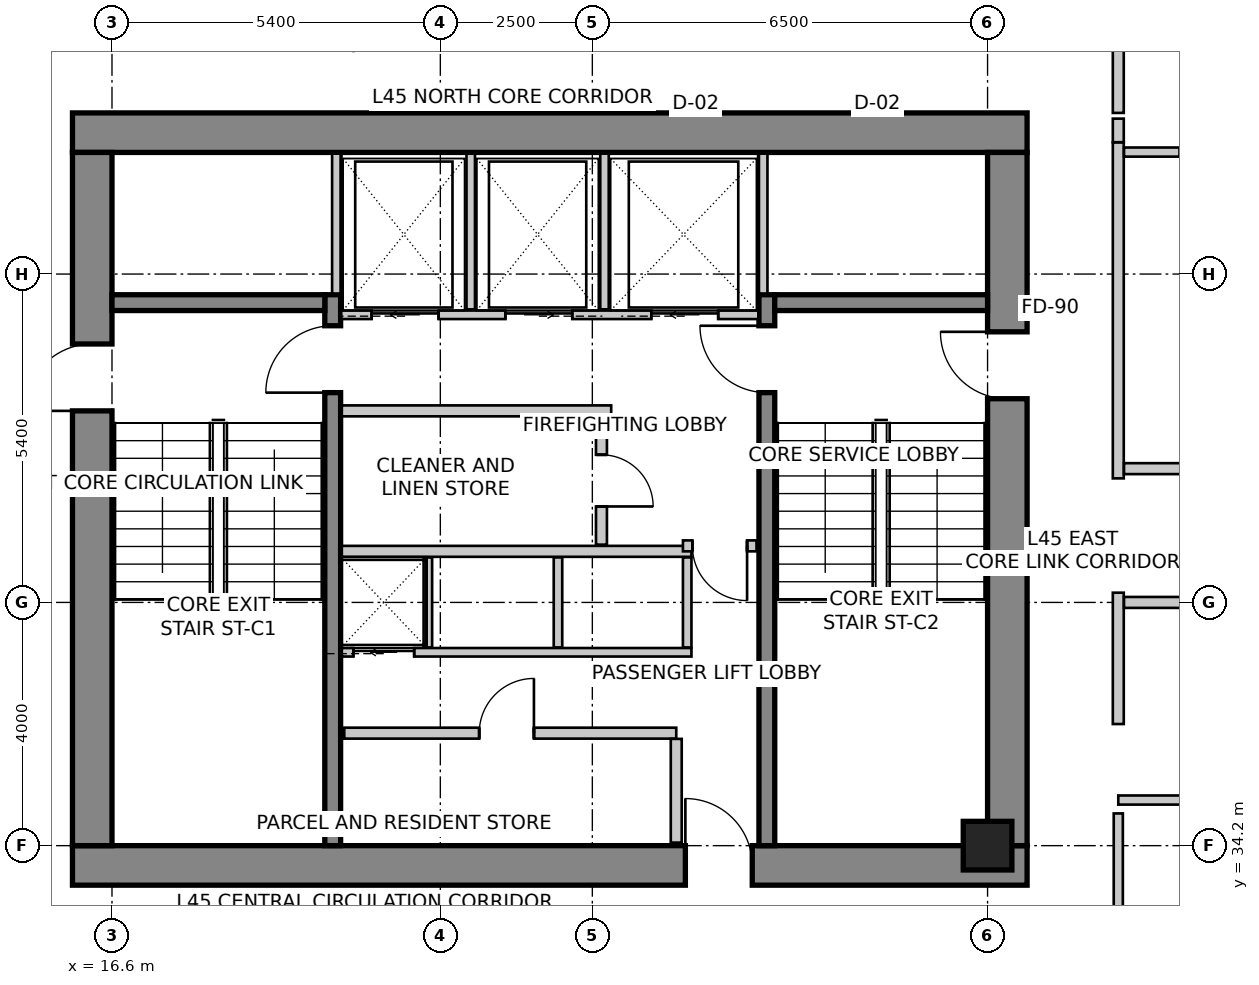
"""IFC4 building model, lengths in metres.
Left out: names, types, materials, properties, quantities, classifications, styles, units other than length and angle.
Written with IfcOpenShell. Run it as: python <this file> out.ifc"""

import sys

from ifc_helpers import new_model, si_unit, direction, frame, frame_2d, origin, origin_2d, place, context, subcontext, project, spatial, rectangle, extrude, source, transform, mapped, element, fill, save


model = new_model("IFC4")
c1 = context("Model", 3, precision=1e-05, world=origin(), true_north=direction((0.0, 1.0)))
c2 = subcontext(c1, "Body", "Model", "MODEL_VIEW")
j1 = project(units=[si_unit("LENGTHUNIT", "METRE"), si_unit("PLANEANGLEUNIT", "RADIAN")], contexts=[c1])
p1 = place(None, origin())
s1 = spatial("IfcSite", under=j1, at=p1, CompositionType="ELEMENT")
p2 = place(p1, origin())
s2 = spatial("IfcBuilding", under=s1, at=p2, CompositionType="ELEMENT")
p3 = place(p2, frame((0.0, 0.0, 183.4)))
s3 = spatial("IfcBuildingStorey", under=s2, at=p3, CompositionType="ELEMENT", Elevation=183.4)
p4 = place(p3, frame((15.95, 45.925, 0.0), z_axis=(0.0, 0.0, 1.0), x_axis=(1.0, 0.0, 0.0)))
e1 = element("IfcWall", 1, at=p4, inside=s3, PredefinedType="SHEAR", context=c2, shape_type="SweptSolid", body=[
    extrude(rectangle(XDim=15.7, YDim=0.65, at=frame_2d((7.85, 0.0))), origin(), (0.0, 0.0, 1.0), 3.5),
])
p5 = place(p3, frame((15.95, 33.875, 0.0), z_axis=(0.0, 0.0, 1.0), x_axis=(1.0, 0.0, 0.0)))
e2 = element("IfcWall", 2, at=p5, inside=s3, PredefinedType="SHEAR", context=c2, shape_type="SweptSolid", body=[
    extrude(rectangle(XDim=15.7, YDim=0.65, at=frame_2d((7.85, 0.0))), origin(), (0.0, 0.0, 1.0), 3.5),
])
m1 = source(origin(), c2, "Body", "SweptSolid", [
    extrude(rectangle(XDim=1.1, YDim=2.15, at=frame_2d((0.55, 1.075))), frame((0.0, 0.335, 0.0), z_axis=(0.0, -1.0, 0.0), x_axis=(1.0, 0.0, 0.0)), (0.0, 0.0, 1.0), 0.67),
])
p6 = place(p5, frame((10.08, 0.0, 0.0)))
e3 = element("IfcOpeningElement", 3, at=p6, cuts=e2, PredefinedType="OPENING", context=c2, shape_type="MappedRepresentation", body=[
    mapped(m1, transform((0.0, 0.0, 0.0), scale=1.0)),
])
p7 = place(p3, frame((16.275, 34.2, 0.0), z_axis=(0.0, 0.0, 1.0), x_axis=(0.0, 1.0, 0.0)))
e4 = element("IfcWall", 4, at=p7, inside=s3, PredefinedType="SHEAR", context=c2, shape_type="SweptSolid", body=[
    extrude(rectangle(XDim=11.4, YDim=0.65, at=frame_2d((5.7, 0.0))), origin(), (0.0, 0.0, 1.0), 3.5),
])
p8 = place(p7, frame((7.15, 0.0, 0.0)))
e5 = element("IfcOpeningElement", 5, at=p8, cuts=e4, PredefinedType="OPENING", context=c2, shape_type="MappedRepresentation", body=[
    mapped(m1, transform((0.0, 0.0, 0.0), scale=1.0)),
])
p9 = place(p3, frame((31.325, 34.2, 0.0), z_axis=(0.0, 0.0, 1.0), x_axis=(0.0, 1.0, 0.0)))
e6 = element("IfcWall", 6, at=p9, inside=s3, PredefinedType="SHEAR", context=c2, shape_type="SweptSolid", body=[
    extrude(rectangle(XDim=11.4, YDim=0.65, at=frame_2d((5.7, 0.0))), origin(), (0.0, 0.0, 1.0), 3.5),
])
p10 = place(p9, frame((7.35, 0.0, 0.0)))
e7 = element("IfcOpeningElement", 7, at=p10, cuts=e6, PredefinedType="OPENING", context=c2, shape_type="MappedRepresentation", body=[
    mapped(m1, transform((0.0, 0.0, 0.0), scale=1.0)),
])
p11 = place(p3, frame((20.23, 34.2, 0.0), z_axis=(0.0, 0.0, 1.0), x_axis=(0.0, 1.0, 0.0)))
e8 = element("IfcWall", 8, at=p11, inside=s3, PredefinedType="SHEAR", context=c2, shape_type="SweptSolid", body=[
    extrude(rectangle(XDim=9.06, YDim=0.26, at=frame_2d((4.53, 0.0))), origin(), (0.0, 0.0, 1.0), 3.5),
])
m2 = source(origin(), c2, "Body", "SweptSolid", [
    extrude(rectangle(XDim=1.1, YDim=2.15, at=frame_2d((0.55, 1.075))), frame((0.0, 0.14, 0.0), z_axis=(0.0, -1.0, 0.0), x_axis=(1.0, 0.0, 0.0)), (0.0, 0.0, 1.0), 0.28),
])
p12 = place(p11, frame((7.45, 0.0, 0.0)))
e9 = element("IfcOpeningElement", 9, at=p12, cuts=e8, PredefinedType="OPENING", context=c2, shape_type="MappedRepresentation", body=[
    mapped(m2, transform((0.0, 0.0, 0.0), scale=1.0)),
])
p13 = place(p3, frame((27.37, 34.2, 0.0), z_axis=(0.0, 0.0, 1.0), x_axis=(0.0, 1.0, 0.0)))
e10 = element("IfcWall", 10, at=p13, inside=s3, PredefinedType="SHEAR", context=c2, shape_type="SweptSolid", body=[
    extrude(rectangle(XDim=9.06, YDim=0.26, at=frame_2d((4.53, 0.0))), origin(), (0.0, 0.0, 1.0), 3.5),
])
p14 = place(p13, frame((7.45, 0.0, 0.0)))
e11 = element("IfcOpeningElement", 11, at=p14, cuts=e10, PredefinedType="OPENING", context=c2, shape_type="MappedRepresentation", body=[
    mapped(m2, transform((0.0, 0.0, 0.0), scale=1.0)),
])
for number, where, z_axis, x_axis in (
    (12, (16.6, 43.13, 0.0), (0.0, 0.0, 1.0), (1.0, 0.0, 0.0)),
    (13, (27.5, 43.13, 0.0), (0.0, 0.0, 1.0), (1.0, 0.0, 0.0)),
):
    element("IfcWall", number, at=place(p3, frame(where, z_axis=z_axis, x_axis=x_axis)), inside=s3, PredefinedType="SHEAR", context=c2, shape_type="SweptSolid", body=[
        extrude(rectangle(XDim=3.5, YDim=0.26, at=frame_2d((1.75, 0.0))), origin(), (0.0, 0.0, 1.0), 3.5),
    ])
m3 = source(origin(), c2, "Body", "SweptSolid", [
    extrude(rectangle(XDim=0.8, YDim=0.8, at=origin_2d()), origin(), (0.0, 0.0, 1.0), 3.5),
])
p15 = place(p3, frame((31.0, 34.2, 0.0), z_axis=(0.0, 0.0, 1.0), x_axis=(1.0, 0.0, 0.0)))
e14 = element("IfcColumn", 14, at=p15, inside=s3, PredefinedType="COLUMN", context=c2, shape_type="MappedRepresentation", body=[
    mapped(m3, transform((0.0, 0.0, 0.0), scale=1.0)),
])
p16 = place(p3, frame((21.875, 52.742, 0.0), z_axis=(0.0, 0.0, 1.0), x_axis=(-0.843666375448, -0.536867811419, 0.0)))
e15 = element("IfcWall", 15, at=p16, inside=s3, PredefinedType="SOLIDWALL", context=c2, shape_type="SweptSolid", body=[
    extrude(rectangle(XDim=10.284, YDim=0.3, at=frame_2d((5.142, 0.0))), origin(), (0.0, 0.0, 1.0), 3.25),
])
m4 = source(origin(), c2, "Body", "SweptSolid", [
    extrude(rectangle(XDim=2.4, YDim=2.2, at=frame_2d((1.2, 1.1))), frame((0.0, 0.16, 0.0), z_axis=(0.0, -1.0, 0.0), x_axis=(1.0, 0.0, 0.0)), (0.0, 0.0, 1.0), 0.32),
])
p17 = place(p16, frame((3.307, 0.0, 0.85)))
e16 = element("IfcOpeningElement", 16, at=p17, cuts=e15, PredefinedType="OPENING", context=c2, shape_type="MappedRepresentation", body=[
    mapped(m4, transform((0.0, 0.0, 0.0), scale=1.0)),
])
p18 = place(p3, frame((20.37, 42.93, 0.0), z_axis=(0.0, 0.0, 1.0), x_axis=(1.0, 0.0, 0.0)))
e17 = element("IfcWall", 17, at=p18, inside=s3, PredefinedType="SOLIDWALL", context=c2, shape_type="SweptSolid", body=[
    extrude(rectangle(XDim=6.86, YDim=0.14, at=frame_2d((3.43, 0.0))), origin(), (0.0, 0.0, 1.0), 3.25),
])
m5 = source(origin(), c2, "Body", "SweptSolid", [
    extrude(rectangle(XDim=1.1, YDim=2.15, at=frame_2d((0.55, 1.075))), frame((0.0, 0.08, 0.0), z_axis=(0.0, -1.0, 0.0), x_axis=(1.0, 0.0, 0.0)), (0.0, 0.0, 1.0), 0.16),
])
p19 = place(p18, frame((0.5, 0.0, 0.0)))
e18 = element("IfcOpeningElement", 18, at=p19, cuts=e17, PredefinedType="OPENING", context=c2, shape_type="MappedRepresentation", body=[
    mapped(m5, transform((0.0, 0.0, 0.0), scale=1.0)),
])
p20 = place(p18, frame((2.7, 0.0, 0.0)))
e19 = element("IfcOpeningElement", 19, at=p20, cuts=e17, PredefinedType="OPENING", context=c2, shape_type="MappedRepresentation", body=[
    mapped(m5, transform((0.0, 0.0, 0.0), scale=1.0)),
])
p21 = place(p18, frame((5.1, 0.0, 0.0)))
e20 = element("IfcOpeningElement", 20, at=p21, cuts=e17, PredefinedType="OPENING", context=c2, shape_type="MappedRepresentation", body=[
    mapped(m5, transform((0.0, 0.0, 0.0), scale=1.0)),
])
for number, where, z_axis, x_axis in (
    (21, (20.29, 43.28, 0.0), (0.0, 0.0, 1.0), (0.0, 1.0, 0.0)),
    (22, (27.31, 43.28, 0.0), (0.0, 0.0, 1.0), (0.0, 1.0, 0.0)),
):
    element("IfcWall", number, at=place(p3, frame(where, z_axis=z_axis, x_axis=x_axis)), inside=s3, PredefinedType="SOLIDWALL", context=c2, shape_type="SweptSolid", body=[
        extrude(rectangle(XDim=2.3, YDim=0.14, at=frame_2d((1.15, 0.0))), origin(), (0.0, 0.0, 1.0), 3.25),
    ])
for number, where, z_axis, x_axis in (
    (23, (22.5, 43.02, 0.0), (0.0, 0.0, 1.0), (0.0, 1.0, 0.0)),
    (24, (24.7, 43.02, 0.0), (0.0, 0.0, 1.0), (0.0, 1.0, 0.0)),
):
    element("IfcWall", number, at=place(p3, frame(where, z_axis=z_axis, x_axis=x_axis)), inside=s3, PredefinedType="SOLIDWALL", context=c2, shape_type="SweptSolid", body=[
        extrude(rectangle(XDim=2.56, YDim=0.14, at=frame_2d((1.28, 0.0))), origin(), (0.0, 0.0, 1.0), 3.25),
    ])
p22 = place(p3, frame((20.38, 37.38, 0.0), z_axis=(0.0, 0.0, 1.0), x_axis=(1.0, 0.0, 0.0)))
e25 = element("IfcWall", 25, at=p22, inside=s3, PredefinedType="SOLIDWALL", context=c2, shape_type="SweptSolid", body=[
    extrude(rectangle(XDim=5.75, YDim=0.14, at=frame_2d((2.875, 0.0))), origin(), (0.0, 0.0, 1.0), 3.25),
])
m6 = source(origin(), c2, "Body", "SweptSolid", [
    extrude(rectangle(XDim=1.0, YDim=2.15, at=frame_2d((0.5, 1.075))), frame((0.0, 0.08, 0.0), z_axis=(0.0, -1.0, 0.0), x_axis=(1.0, 0.0, 0.0)), (0.0, 0.0, 1.0), 0.16),
])
p23 = place(p22, frame((0.19, 0.0, 0.0)))
e26 = element("IfcOpeningElement", 26, at=p23, cuts=e25, PredefinedType="OPENING", context=c2, shape_type="MappedRepresentation", body=[
    mapped(m6, transform((0.0, 0.0, 0.0), scale=1.0)),
])
p24 = place(p3, frame((20.38, 39.04, 0.0), z_axis=(0.0, 0.0, 1.0), x_axis=(1.0, 0.0, 0.0)))
e27 = element("IfcWall", 27, at=p24, inside=s3, PredefinedType="SOLIDWALL", context=c2, shape_type="SweptSolid", body=[
    extrude(rectangle(XDim=5.75, YDim=0.18, at=frame_2d((2.875, 0.0))), origin(), (0.0, 0.0, 1.0), 3.25),
])
for number, where, z_axis, x_axis in (
    (28, (26.06, 37.46, 0.0), (0.0, 0.0, 1.0), (0.0, 1.0, 0.0)),
    (29, (21.795, 37.46, 0.0), (0.0, 0.0, 1.0), (0.0, 1.0, 0.0)),
    (30, (23.935, 37.46, 0.0), (0.0, 0.0, 1.0), (0.0, 1.0, 0.0)),
):
    element("IfcWall", number, at=place(p3, frame(where, z_axis=z_axis, x_axis=x_axis)), inside=s3, PredefinedType="SOLIDWALL", context=c2, shape_type="SweptSolid", body=[
        extrude(rectangle(XDim=1.48, YDim=0.14, at=frame_2d((0.74, 0.0))), origin(), (0.0, 0.0, 1.0), 3.25),
    ])
p25 = place(p3, frame((24.81, 41.35, 0.0), z_axis=(0.0, 0.0, 1.0), x_axis=(-1.0, 0.0, 0.0)))
e31 = element("IfcWall", 31, at=p25, inside=s3, PredefinedType="PARTITIONING", context=c2, shape_type="SweptSolid", body=[
    extrude(rectangle(XDim=4.43, YDim=0.18, at=frame_2d((2.215, 0.0))), origin(), (0.0, 0.0, 1.0), 3.25),
])
p26 = place(p3, frame((24.65, 41.256, 0.0), z_axis=(0.0, 0.0, 1.0), x_axis=(0.0, -1.0, 0.0)))
e32 = element("IfcWall", 32, at=p26, inside=s3, PredefinedType="PARTITIONING", context=c2, shape_type="SweptSolid", body=[
    extrude(rectangle(XDim=2.106, YDim=0.18, at=frame_2d((1.053, 0.0))), origin(), (0.0, 0.0, 1.0), 3.25),
])
m7 = source(origin(), c2, "Body", "SweptSolid", [
    extrude(rectangle(XDim=0.85, YDim=2.15, at=frame_2d((0.425, 1.075))), frame((0.0, 0.1, 0.0), z_axis=(0.0, -1.0, 0.0), x_axis=(1.0, 0.0, 0.0)), (0.0, 0.0, 1.0), 0.2),
])
p27 = place(p26, frame((0.628, 0.0, 0.0)))
e33 = element("IfcOpeningElement", 33, at=p27, cuts=e32, PredefinedType="OPENING", context=c2, shape_type="MappedRepresentation", body=[
    mapped(m7, transform((0.0, 0.0, 0.0), scale=1.0)),
])
p28 = place(p3, frame((27.2, 39.13, 0.0), z_axis=(0.0, 0.0, 1.0), x_axis=(-1.0, 0.0, 0.0)))
e34 = element("IfcWall", 34, at=p28, inside=s3, PredefinedType="PARTITIONING", context=c2, shape_type="SweptSolid", body=[
    extrude(rectangle(XDim=1.21, YDim=0.18, at=frame_2d((0.605, 0.0))), origin(), (0.0, 0.0, 1.0), 3.25),
])
m8 = source(origin(), c2, "Body", "SweptSolid", [
    extrude(rectangle(XDim=0.9, YDim=2.15, at=frame_2d((0.45, 1.075))), frame((0.0, 0.1, 0.0), z_axis=(0.0, -1.0, 0.0), x_axis=(1.0, 0.0, 0.0)), (0.0, 0.0, 1.0), 0.2),
])
p29 = place(p28, frame((0.155, 0.0, 0.0)))
e35 = element("IfcOpeningElement", 35, at=p29, cuts=e34, PredefinedType="OPENING", context=c2, shape_type="MappedRepresentation", body=[
    mapped(m8, transform((0.0, 0.0, 0.0), scale=1.0)),
])
p30 = place(p3, frame((20.42, 36.05, 0.0), z_axis=(0.0, 0.0, 1.0), x_axis=(1.0, 0.0, 0.0)))
e36 = element("IfcWall", 36, at=p30, inside=s3, PredefinedType="PARTITIONING", context=c2, shape_type="SweptSolid", body=[
    extrude(rectangle(XDim=5.46, YDim=0.18, at=frame_2d((2.73, 0.0))), origin(), (0.0, 0.0, 1.0), 3.25),
])
p31 = place(p30, frame((2.219, 0.0, 0.0)))
e37 = element("IfcOpeningElement", 37, at=p31, cuts=e36, PredefinedType="OPENING", context=c2, shape_type="MappedRepresentation", body=[
    mapped(m8, transform((0.0, 0.0, 0.0), scale=1.0)),
])
p32 = place(p3, frame((25.88, 35.956, 0.0), z_axis=(0.0, 0.0, 1.0), x_axis=(0.0, -1.0, 0.0)))
e38 = element("IfcWall", 38, at=p32, inside=s3, PredefinedType="PARTITIONING", context=c2, shape_type="SweptSolid", body=[
    extrude(rectangle(XDim=1.706, YDim=0.18, at=frame_2d((0.853, 0.0))), origin(), (0.0, 0.0, 1.0), 2.542),
])
p33 = place(p3, frame((33.15, 47.706, 0.0), z_axis=(0.0, 0.0, 1.0), x_axis=(0.0, -1.0, 0.0)))
e39 = element("IfcWall", 39, at=p33, inside=s3, PredefinedType="PARTITIONING", context=c2, shape_type="SweptSolid", body=[
    extrude(rectangle(XDim=1.456, YDim=0.18, at=frame_2d((0.728, 0.0))), origin(), (0.0, 0.0, 1.0), 2.688),
])
p34 = place(p3, frame((33.15, 45.766, 0.0), z_axis=(0.0, 0.0, 1.0), x_axis=(0.0, -1.0, 0.0)))
e40 = element("IfcWall", 40, at=p34, inside=s3, PredefinedType="PARTITIONING", context=c2, shape_type="SweptSolid", body=[
    extrude(rectangle(XDim=5.526, YDim=0.18, at=frame_2d((2.763, 0.0))), origin(), (0.0, 0.0, 1.0), 2.688),
])
p35 = place(p3, frame((33.15, 46.156, 0.0), z_axis=(0.0, 0.0, 1.0), x_axis=(0.0, -1.0, 0.0)))
e41 = element("IfcWall", 41, at=p35, inside=s3, PredefinedType="PARTITIONING", context=c2, shape_type="SweptSolid", body=[
    extrude(rectangle(XDim=0.388, YDim=0.18, at=frame_2d((0.194, 0.0))), origin(), (0.0, 0.0, 1.0), 3.25),
])
p36 = place(p3, frame((33.15, 38.36, 0.0), z_axis=(0.0, 0.0, 1.0), x_axis=(0.0, -1.0, 0.0)))
e42 = element("IfcWall", 42, at=p36, inside=s3, PredefinedType="PARTITIONING", context=c2, shape_type="SweptSolid", body=[
    extrude(rectangle(XDim=2.16, YDim=0.18, at=frame_2d((1.08, 0.0))), origin(), (0.0, 0.0, 1.0), 3.25),
])
p37 = place(p3, frame((33.244, 40.4, 0.0), z_axis=(0.0, 0.0, 1.0), x_axis=(1.0, 0.0, 0.0)))
e43 = element("IfcWall", 43, at=p37, inside=s3, PredefinedType="PARTITIONING", context=c2, shape_type="SweptSolid", body=[
    extrude(rectangle(XDim=9.266, YDim=0.18, at=frame_2d((4.633, 0.0))), origin(), (0.0, 0.0, 1.0), 2.688),
])
p38 = place(p37, frame((2.802, 0.0, 0.0)))
e44 = element("IfcOpeningElement", 44, at=p38, cuts=e43, PredefinedType="OPENING", context=c2, shape_type="MappedRepresentation", body=[
    mapped(m8, transform((0.0, 0.0, 0.0), scale=1.0)),
])
p39 = place(p3, frame((42.51, 38.2, 0.0), z_axis=(0.0, 0.0, 1.0), x_axis=(-1.0, 0.0, 0.0)))
e45 = element("IfcWall", 45, at=p39, inside=s3, PredefinedType="PARTITIONING", context=c2, shape_type="SweptSolid", body=[
    extrude(rectangle(XDim=9.266, YDim=0.18, at=frame_2d((4.633, 0.0))), origin(), (0.0, 0.0, 1.0), 2.688),
])
p40 = place(p39, frame((4.123, 0.0, 0.0)))
e46 = element("IfcOpeningElement", 46, at=p40, cuts=e45, PredefinedType="OPENING", context=c2, shape_type="MappedRepresentation", body=[
    mapped(m8, transform((0.0, 0.0, 0.0), scale=1.0)),
])
p41 = place(p3, frame((33.244, 45.606, 0.0), z_axis=(0.0, 0.0, 1.0), x_axis=(1.0, 0.0, 0.0)))
e47 = element("IfcWall", 47, at=p41, inside=s3, PredefinedType="PARTITIONING", context=c2, shape_type="SweptSolid", body=[
    extrude(rectangle(XDim=2.816, YDim=0.15, at=frame_2d((1.408, 0.0))), origin(), (0.0, 0.0, 1.0), 2.688),
])
m9 = source(origin(), c2, "Body", "SweptSolid", [
    extrude(rectangle(XDim=0.85, YDim=2.15, at=frame_2d((0.425, 1.075))), frame((0.0, 0.085, 0.0), z_axis=(0.0, -1.0, 0.0), x_axis=(1.0, 0.0, 0.0)), (0.0, 0.0, 1.0), 0.17),
])
p42 = place(p41, frame((0.919, 0.0, 0.0)))
e48 = element("IfcOpeningElement", 48, at=p42, cuts=e47, PredefinedType="OPENING", context=c2, shape_type="MappedRepresentation", body=[
    mapped(m9, transform((0.0, 0.0, 0.0), scale=1.0)),
])
p43 = place(p3, frame((36.06, 34.95, 0.0), z_axis=(0.0, 0.0, 1.0), x_axis=(-1.0, 0.0, 0.0)))
e49 = element("IfcWall", 49, at=p43, inside=s3, PredefinedType="PARTITIONING", context=c2, shape_type="SweptSolid", body=[
    extrude(rectangle(XDim=2.91, YDim=0.15, at=frame_2d((1.455, 0.0))), origin(), (0.0, 0.0, 1.0), 3.25),
])
p44 = place(p43, frame((1.03, 0.0, 0.0)))
e50 = element("IfcOpeningElement", 50, at=p44, cuts=e49, PredefinedType="OPENING", context=c2, shape_type="MappedRepresentation", body=[
    mapped(m9, transform((0.0, 0.0, 0.0), scale=1.0)),
])
p45 = place(p3, frame((33.15, 32.409, 0.0), z_axis=(0.0, 0.0, 1.0), x_axis=(0.0, 1.0, 0.0)))
e51 = element("IfcWall", 51, at=p45, inside=s3, PredefinedType="PARTITIONING", context=c2, shape_type="SweptSolid", body=[
    extrude(rectangle(XDim=2.321, YDim=0.15, at=frame_2d((1.161, 0.0))), origin(), (0.0, 0.0, 1.0), 3.25),
])
m10 = source(origin(), c2, "Body", "SweptSolid", [
    extrude(rectangle(XDim=1.1, YDim=2.15, at=frame_2d((0.55, 1.075))), frame((0.0, 0.025, 0.0), z_axis=(0.0, -1.0, 0.0), x_axis=(1.0, 0.0, 0.0)), (0.0, 0.0, 1.0), 0.05),
])
p46 = place(p19, origin())
e52 = element("IfcDoor", 52, at=p46, inside=s3, OperationType="SLIDING_TO_LEFT", PredefinedType="DOOR", context=c2, shape_type="MappedRepresentation", body=[
    mapped(m10, transform((0.0, 0.0, 0.0), scale=1.0)),
])
fill(e18, e52)
p47 = place(p20, origin())
e53 = element("IfcDoor", 53, at=p47, inside=s3, OperationType="SLIDING_TO_RIGHT", PredefinedType="DOOR", context=c2, shape_type="MappedRepresentation", body=[
    mapped(m10, transform((0.0, 0.0, 0.0), scale=1.0)),
])
fill(e19, e53)
m11 = source(origin(), c2, "Body", "SweptSolid", [
    extrude(rectangle(XDim=1.1, YDim=2.15, at=frame_2d((0.55, 1.075))), frame((0.0, 0.025, 0.0), z_axis=(0.0, -1.0, 0.0), x_axis=(1.0, 0.0, 0.0)), (0.0, 0.0, 1.0), 0.05),
])
p48 = place(p21, origin())
e54 = element("IfcDoor", 54, at=p48, inside=s3, OperationType="SLIDING_TO_LEFT", PredefinedType="DOOR", context=c2, shape_type="MappedRepresentation", body=[
    mapped(m11, transform((0.0, 0.0, 0.0), scale=1.0)),
])
fill(e20, e54)
m12 = source(origin(), c2, "Body", "SweptSolid", [
    extrude(rectangle(XDim=1.0, YDim=2.15, at=frame_2d((0.5, 1.075))), frame((0.0, 0.025, 0.0), z_axis=(0.0, -1.0, 0.0), x_axis=(1.0, 0.0, 0.0)), (0.0, 0.0, 1.0), 0.05),
])
p49 = place(p23, origin())
e55 = element("IfcDoor", 55, at=p49, inside=s3, OperationType="SLIDING_TO_LEFT", PredefinedType="DOOR", context=c2, shape_type="MappedRepresentation", body=[
    mapped(m12, transform((0.0, 0.0, 0.0), scale=1.0)),
])
fill(e26, e55)
m13 = source(origin(), c2, "Body", "SweptSolid", [
    extrude(rectangle(XDim=1.1, YDim=2.15, at=frame_2d((0.55, 1.075))), frame((0.0, 0.025, 0.0), z_axis=(0.0, -1.0, 0.0), x_axis=(1.0, 0.0, 0.0)), (0.0, 0.0, 1.0), 0.05),
])
p50 = place(p12, origin())
e56 = element("IfcDoor", 56, at=p50, inside=s3, OperationType="SINGLE_SWING_LEFT", PredefinedType="DOOR", context=c2, shape_type="MappedRepresentation", body=[
    mapped(m13, transform((0.0, 0.0, 0.0), scale=1.0)),
])
fill(e9, e56)
p51 = place(p14, origin())
e57 = element("IfcDoor", 57, at=p51, inside=s3, OperationType="SINGLE_SWING_RIGHT", PredefinedType="DOOR", context=c2, shape_type="MappedRepresentation", body=[
    mapped(m13, transform((0.0, 0.0, 0.0), scale=1.0)),
])
fill(e11, e57)
p52 = place(p8, origin())
e58 = element("IfcDoor", 58, at=p52, inside=s3, OperationType="SINGLE_SWING_LEFT", PredefinedType="DOOR", context=c2, shape_type="MappedRepresentation", body=[
    mapped(m13, transform((0.0, 0.0, 0.0), scale=1.0)),
])
fill(e5, e58)
p53 = place(p10, origin())
e59 = element("IfcDoor", 59, at=p53, inside=s3, OperationType="SINGLE_SWING_RIGHT", PredefinedType="DOOR", context=c2, shape_type="MappedRepresentation", body=[
    mapped(m13, transform((0.0, 0.0, 0.0), scale=1.0)),
])
fill(e7, e59)
p54 = place(p6, origin())
e60 = element("IfcDoor", 60, at=p54, inside=s3, OperationType="SINGLE_SWING_LEFT", PredefinedType="DOOR", context=c2, shape_type="MappedRepresentation", body=[
    mapped(m13, transform((0.0, 0.0, 0.0), scale=1.0)),
])
fill(e3, e60)
m14 = source(origin(), c2, "Body", "SweptSolid", [
    extrude(rectangle(XDim=0.85, YDim=2.15, at=frame_2d((0.425, 1.075))), frame((0.0, 0.025, 0.0), z_axis=(0.0, -1.0, 0.0), x_axis=(1.0, 0.0, 0.0)), (0.0, 0.0, 1.0), 0.05),
])
p55 = place(p27, origin())
e61 = element("IfcDoor", 61, at=p55, inside=s3, OperationType="SINGLE_SWING_RIGHT", PredefinedType="DOOR", context=c2, shape_type="MappedRepresentation", body=[
    mapped(m14, transform((0.0, 0.0, 0.0), scale=1.0)),
])
fill(e33, e61)
m15 = source(origin(), c2, "Body", "SweptSolid", [
    extrude(rectangle(XDim=0.9, YDim=2.15, at=frame_2d((0.45, 1.075))), frame((0.0, 0.025, 0.0), z_axis=(0.0, -1.0, 0.0), x_axis=(1.0, 0.0, 0.0)), (0.0, 0.0, 1.0), 0.05),
])
p56 = place(p29, origin())
e62 = element("IfcDoor", 62, at=p56, inside=s3, OperationType="SINGLE_SWING_LEFT", PredefinedType="DOOR", context=c2, shape_type="MappedRepresentation", body=[
    mapped(m15, transform((0.0, 0.0, 0.0), scale=1.0)),
])
fill(e35, e62)
p57 = place(p31, origin())
e63 = element("IfcDoor", 63, at=p57, inside=s3, OperationType="SINGLE_SWING_RIGHT", PredefinedType="DOOR", context=c2, shape_type="MappedRepresentation", body=[
    mapped(m15, transform((0.0, 0.0, 0.0), scale=1.0)),
])
fill(e37, e63)
save(model, sys.argv[1])
